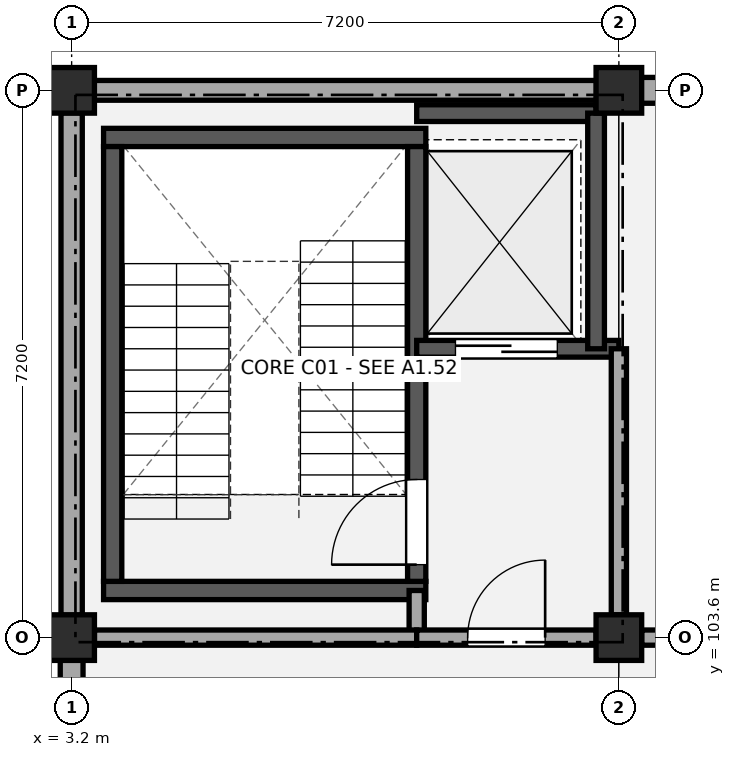
"""IFC4 building model, lengths in metres.
Left out: names, types, materials, properties, quantities, classifications, styles, units other than length and angle.
Written with IfcOpenShell. Run it as: python <this file> out.ifc"""

import sys

from ifc_helpers import new_model, si_unit, direction, frame, frame_2d, origin, origin_2d, place, context, subcontext, project, spatial, rectangle, extrude, element, fill, save


model = new_model("IFC4")
c1 = context("Model", 3, precision=1e-05, world=origin(), true_north=direction((0.0, 1.0)))
c2 = subcontext(c1, "Body", "Model", "MODEL_VIEW")
j1 = project(units=[si_unit("LENGTHUNIT", "METRE"), si_unit("PLANEANGLEUNIT", "RADIAN")], contexts=[c1])
p1 = place(None, origin())
s1 = spatial("IfcSite", under=j1, at=p1, CompositionType="ELEMENT")
p2 = place(p1, origin())
s2 = spatial("IfcBuilding", under=s1, at=p2, CompositionType="ELEMENT")
p3 = place(p2, frame((0.0, 0.0, 4.68)))
s3 = spatial("IfcBuildingStorey", under=s2, at=p3, CompositionType="ELEMENT", Elevation=4.68)
for number, where, z_axis, x_axis in (
    (1, (3.2, 103.6, 0.0), (0.0, 0.0, 1.0), (1.0, 0.0, 0.0)),
    (2, (3.2, 110.8, 0.0), (0.0, 0.0, 1.0), (1.0, 0.0, 0.0)),
    (3, (10.4, 103.6, 0.0), (0.0, 0.0, 1.0), (1.0, 0.0, 0.0)),
    (4, (10.4, 110.8, 0.0), (0.0, 0.0, 1.0), (1.0, 0.0, 0.0)),
):
    element("IfcColumn", number, at=place(p3, frame(where, z_axis=z_axis, x_axis=x_axis)), inside=s3, PredefinedType="COLUMN", context=c2, shape_type="SweptSolid", body=[
        extrude(rectangle(XDim=0.6, YDim=0.6, at=origin_2d()), origin(), (0.0, 0.0, 1.0), 4.5),
    ])
p4 = place(p3, frame((3.495, 110.8, 0.0), z_axis=(0.0, 0.0, 1.0), x_axis=(1.0, 0.0, 0.0)))
e5 = element("IfcWall", 5, at=p4, inside=s3, PredefinedType="STANDARD", context=c2, shape_type="SweptSolid", body=[
    extrude(rectangle(XDim=6.61, YDim=0.26, at=frame_2d((3.305, 0.0))), origin(), (0.0, 0.0, 1.0), 3.49),
])
p5 = place(p3, frame((10.695, 110.8, 0.0), z_axis=(0.0, 0.0, 1.0), x_axis=(1.0, 0.0, 0.0)))
e6 = element("IfcWall", 6, at=p5, inside=s3, PredefinedType="STANDARD", context=c2, shape_type="SweptSolid", body=[
    extrude(rectangle(XDim=6.61, YDim=0.34, at=frame_2d((3.305, 0.0))), origin(), (0.0, 0.0, 1.0), 3.51),
])
p6 = place(p3, frame((3.2, 96.695, 0.0), z_axis=(0.0, 0.0, 1.0), x_axis=(0.0, 1.0, 0.0)))
e7 = element("IfcWall", 7, at=p6, inside=s3, PredefinedType="STANDARD", context=c2, shape_type="SweptSolid", body=[
    extrude(rectangle(XDim=6.61, YDim=0.3, at=frame_2d((3.305, 0.0))), origin(), (0.0, 0.0, 1.0), 3.51),
])
p7 = place(p3, frame((3.2, 103.895, 0.0), z_axis=(0.0, 0.0, 1.0), x_axis=(0.0, 1.0, 0.0)))
e8 = element("IfcWall", 8, at=p7, inside=s3, PredefinedType="STANDARD", context=c2, shape_type="SweptSolid", body=[
    extrude(rectangle(XDim=6.61, YDim=0.28, at=frame_2d((3.305, 0.0))), origin(), (0.0, 0.0, 1.0), 3.49),
])
for number, where, z_axis, x_axis in (
    (9, (3.62, 104.22, 0.0), (0.0, 0.0, 1.0), (1.0, 0.0, 0.0)),
    (10, (3.62, 110.18, 0.0), (0.0, 0.0, 1.0), (1.0, 0.0, 0.0)),
):
    element("IfcWall", number, at=place(p3, frame(where, z_axis=z_axis, x_axis=x_axis)), inside=s3, PredefinedType="SHEAR", context=c2, shape_type="SweptSolid", body=[
        extrude(rectangle(XDim=4.24, YDim=0.24, at=frame_2d((2.12, 0.0))), origin(), (0.0, 0.0, 1.0), 4.2),
    ])
p8 = place(p3, frame((3.74, 104.34, 0.0), z_axis=(0.0, 0.0, 1.0), x_axis=(0.0, 1.0, 0.0)))
e11 = element("IfcWall", 11, at=p8, inside=s3, PredefinedType="SHEAR", context=c2, shape_type="SweptSolid", body=[
    extrude(rectangle(XDim=5.72, YDim=0.24, at=frame_2d((2.86, 0.0))), origin(), (0.0, 0.0, 1.0), 4.2),
])
p9 = place(p3, frame((7.74, 104.34, 0.0), z_axis=(0.0, 0.0, 1.0), x_axis=(0.0, 1.0, 0.0)))
e12 = element("IfcWall", 12, at=p9, inside=s3, PredefinedType="SHEAR", context=c2, shape_type="SweptSolid", body=[
    extrude(rectangle(XDim=5.72, YDim=0.24, at=frame_2d((2.86, 0.0))), origin(), (0.0, 0.0, 1.0), 4.2),
])
p10 = place(p9, frame((0.22, 0.0, 0.0)))
e13 = element("IfcOpeningElement", 13, at=p10, cuts=e12, PredefinedType="OPENING", context=c2, shape_type="SweptSolid", body=[
    extrude(rectangle(XDim=1.12, YDim=2.15, at=frame_2d((0.56, 1.075))), frame((0.0, 0.13, 0.0), z_axis=(0.0, -1.0, 0.0), x_axis=(1.0, 0.0, 0.0)), (0.0, 0.0, 1.0), 0.26),
])
p11 = place(p3, frame((7.74, 107.4, 0.0), z_axis=(0.0, 0.0, 1.0), x_axis=(1.0, 0.0, 0.0)))
e14 = element("IfcWall", 14, at=p11, inside=s3, PredefinedType="SHEAR", context=c2, shape_type="SweptSolid", body=[
    extrude(rectangle(XDim=2.66, YDim=0.22, at=frame_2d((1.33, 0.0))), origin(), (0.0, 0.0, 1.0), 4.2),
])
p12 = place(p11, frame((0.51, 0.0, 0.0)))
e15 = element("IfcOpeningElement", 15, at=p12, cuts=e14, PredefinedType="OPENING", context=c2, shape_type="SweptSolid", body=[
    extrude(rectangle(XDim=1.34, YDim=2.15, at=frame_2d((0.67, 1.075))), frame((0.0, 0.12, 0.0), z_axis=(0.0, -1.0, 0.0), x_axis=(1.0, 0.0, 0.0)), (0.0, 0.0, 1.0), 0.24),
])
p13 = place(p3, frame((7.74, 110.5, 0.0), z_axis=(0.0, 0.0, 1.0), x_axis=(1.0, 0.0, 0.0)))
e16 = element("IfcWall", 16, at=p13, inside=s3, PredefinedType="SHEAR", context=c2, shape_type="SweptSolid", body=[
    extrude(rectangle(XDim=2.36, YDim=0.22, at=frame_2d((1.18, 0.0))), origin(), (0.0, 0.0, 1.0), 4.2),
])
p14 = place(p3, frame((10.1, 107.4, 0.0), z_axis=(0.0, 0.0, 1.0), x_axis=(0.0, 1.0, 0.0)))
e17 = element("IfcWall", 17, at=p14, inside=s3, PredefinedType="SHEAR", context=c2, shape_type="SweptSolid", body=[
    extrude(rectangle(XDim=3.1, YDim=0.22, at=frame_2d((1.55, 0.0))), origin(), (0.0, 0.0, 1.0), 4.2),
])
p15 = place(p3, frame((7.74, 103.6, 0.0), z_axis=(0.0, 0.0, 1.0), x_axis=(0.0, 1.0, 0.0)))
e18 = element("IfcWall", 18, at=p15, inside=s3, PredefinedType="PARTITIONING", context=c2, shape_type="SweptSolid", body=[
    extrude(rectangle(XDim=0.62, YDim=0.2, at=frame_2d((0.31, 0.0))), origin(), (0.0, 0.0, 1.0), 3.54),
])
p16 = place(p3, frame((10.4, 103.9, 0.0), z_axis=(0.0, 0.0, 1.0), x_axis=(0.0, 1.0, 0.0)))
e19 = element("IfcWall", 19, at=p16, inside=s3, PredefinedType="PARTITIONING", context=c2, shape_type="SweptSolid", body=[
    extrude(rectangle(XDim=3.5, YDim=0.2, at=frame_2d((1.75, 0.0))), origin(), (0.0, 0.0, 1.0), 3.54),
])
p17 = place(p3, frame((3.5, 103.6, 0.0), z_axis=(0.0, 0.0, 1.0), x_axis=(1.0, 0.0, 0.0)))
e20 = element("IfcWall", 20, at=p17, inside=s3, PredefinedType="PARTITIONING", context=c2, shape_type="SweptSolid", body=[
    extrude(rectangle(XDim=4.24, YDim=0.2, at=frame_2d((2.12, 0.0))), origin(), (0.0, 0.0, 1.0), 3.54),
])
p18 = place(p3, frame((7.74, 103.6, 0.0), z_axis=(0.0, 0.0, 1.0), x_axis=(1.0, 0.0, 0.0)))
e21 = element("IfcWall", 21, at=p18, inside=s3, PredefinedType="PARTITIONING", context=c2, shape_type="SweptSolid", body=[
    extrude(rectangle(XDim=2.36, YDim=0.2, at=frame_2d((1.18, 0.0))), origin(), (0.0, 0.0, 1.0), 3.54),
])
p19 = place(p18, frame((0.67, 0.0, 0.0)))
e22 = element("IfcOpeningElement", 22, at=p19, cuts=e21, PredefinedType="OPENING", context=c2, shape_type="SweptSolid", body=[
    extrude(rectangle(XDim=1.02, YDim=2.15, at=frame_2d((0.51, 1.075))), frame((0.0, 0.11, 0.0), z_axis=(0.0, -1.0, 0.0), x_axis=(1.0, 0.0, 0.0)), (0.0, 0.0, 1.0), 0.22),
])
p20 = place(p3, frame((10.7, 103.6, 0.0), z_axis=(0.0, 0.0, 1.0), x_axis=(1.0, 0.0, 0.0)))
e23 = element("IfcWall", 23, at=p20, inside=s3, PredefinedType="PARTITIONING", context=c2, shape_type="SweptSolid", body=[
    extrude(rectangle(XDim=6.6, YDim=0.2, at=frame_2d((3.3, 0.0))), origin(), (0.0, 0.0, 1.0), 3.59),
])
p21 = place(p20, frame((2.69, 0.0, 0.0)))
e24 = element("IfcOpeningElement", 24, at=p21, cuts=e23, PredefinedType="OPENING", context=c2, shape_type="SweptSolid", body=[
    extrude(rectangle(XDim=1.22, YDim=2.16, at=frame_2d((0.61, 1.08))), frame((0.0, 0.11, 0.0), z_axis=(0.0, -1.0, 0.0), x_axis=(1.0, 0.0, 0.0)), (0.0, 0.0, 1.0), 0.22),
])
p22 = place(p10, origin())
e25 = element("IfcDoor", 25, at=p22, inside=s3, OperationType="SINGLE_SWING_LEFT", PredefinedType="DOOR", context=c2, shape_type="SweptSolid", body=[
    extrude(rectangle(XDim=1.12, YDim=2.15, at=frame_2d((0.56, 1.075))), frame((0.0, 0.025, 0.0), z_axis=(0.0, -1.0, 0.0), x_axis=(1.0, 0.0, 0.0)), (0.0, 0.0, 1.0), 0.05),
])
fill(e13, e25)
p23 = place(p12, origin())
e26 = element("IfcDoor", 26, at=p23, inside=s3, OperationType="DOUBLE_DOOR_SLIDING", PredefinedType="DOOR", context=c2, shape_type="SweptSolid", body=[
    extrude(rectangle(XDim=1.34, YDim=2.15, at=frame_2d((0.67, 1.075))), frame((0.0, 0.025, 0.0), z_axis=(0.0, -1.0, 0.0), x_axis=(1.0, 0.0, 0.0)), (0.0, 0.0, 1.0), 0.05),
])
fill(e15, e26)
p24 = place(p19, origin())
e27 = element("IfcDoor", 27, at=p24, inside=s3, OperationType="SINGLE_SWING_RIGHT", PredefinedType="DOOR", context=c2, shape_type="SweptSolid", body=[
    extrude(rectangle(XDim=1.02, YDim=2.15, at=frame_2d((0.51, 1.075))), frame((0.0, 0.025, 0.0), z_axis=(0.0, -1.0, 0.0), x_axis=(1.0, 0.0, 0.0)), (0.0, 0.0, 1.0), 0.05),
])
fill(e22, e27)
save(model, sys.argv[1])
